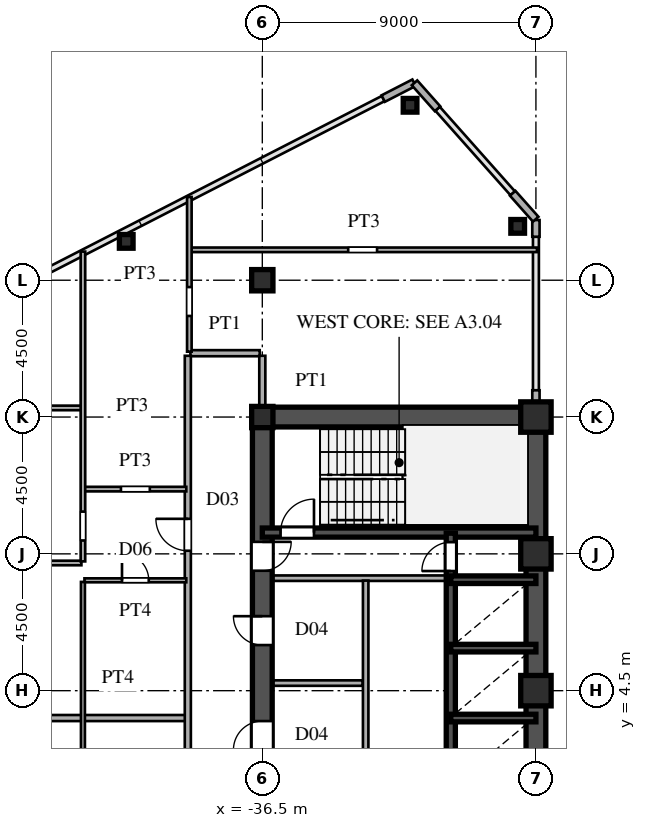
"""IFC4 building model, lengths in metres.
Left out: names, types, materials, properties, quantities, classifications, styles, units other than length and angle.
Written with IfcOpenShell. Run it as: python <this file> out.ifc"""

import sys

from ifc_helpers import new_model, si_unit, direction, frame, frame_2d, origin, origin_2d, place, context, subcontext, project, spatial, rectangle, hollow_rectangle, i_section, extrude, source, transform, mapped, element, fill, save


model = new_model("IFC4")
c1 = context("Model", 3, precision=1e-05, world=origin(), true_north=direction((0.0, 1.0)))
c2 = subcontext(c1, "Body", "Model", "MODEL_VIEW")
j1 = project(units=[si_unit("LENGTHUNIT", "METRE"), si_unit("PLANEANGLEUNIT", "RADIAN")], contexts=[c1])
p1 = place(None, origin())
s1 = spatial("IfcSite", under=j1, at=p1, CompositionType="ELEMENT")
p2 = place(p1, origin())
s2 = spatial("IfcBuilding", under=s1, at=p2, CompositionType="ELEMENT")
p3 = place(p2, frame((0.0, 0.0, 117.6)))
s3 = spatial("IfcBuildingStorey", under=s2, at=p3, CompositionType="ELEMENT", Elevation=117.6)
m1 = source(origin(), c2, "Body", "SweptSolid", [
    extrude(hollow_rectangle(XDim=1.0, YDim=1.0, WallThickness=0.042, at=origin_2d()), origin(), (0.0, 0.0, 1.0), 3.6),
])
for number, where, z_axis, x_axis in (
    (1, (-27.5, 4.5, 0.0), (0.0, 0.0, 1.0), (1.0, 0.0, 0.0)),
    (2, (-27.5, 9.0, 0.0), (0.0, 0.0, 1.0), (1.0, 0.0, 0.0)),
    (3, (-27.5, 13.5, 0.0), (0.0, 0.0, 1.0), (1.0, 0.0, 0.0)),
):
    element("IfcColumn", number, at=place(p3, frame(where, z_axis=z_axis, x_axis=x_axis)), inside=s3, PredefinedType="COLUMN", context=c2, shape_type="MappedRepresentation", body=[
        mapped(m1, transform((0.0, 0.0, 0.0), scale=1.0)),
    ])
m2 = source(origin(), c2, "Body", "SweptSolid", [
    extrude(i_section(OverallWidth=0.7, OverallDepth=0.7, WebThickness=0.028, FlangeThickness=0.045, at=origin_2d()), origin(), (0.0, 0.0, 1.0), 3.6),
])
for number, where, z_axis, x_axis in (
    (4, (-36.5, 13.5, 0.0), (0.0, 0.0, 1.0), (1.0, 0.0, 0.0)),
    (5, (-36.5, 18.0, 0.0), (0.0, 0.0, 1.0), (1.0, 0.0, 0.0)),
):
    element("IfcColumn", number, at=place(p3, frame(where, z_axis=z_axis, x_axis=x_axis)), inside=s3, PredefinedType="COLUMN", context=c2, shape_type="MappedRepresentation", body=[
        mapped(m2, transform((0.0, 0.0, 0.0), scale=1.0)),
    ])
m3 = source(origin(), c2, "Body", "SweptSolid", [
    extrude(hollow_rectangle(XDim=0.45, YDim=0.45, WallThickness=0.018, at=origin_2d()), origin(), (0.0, 0.0, 1.0), 3.6),
])
for number, where, z_axis, x_axis in (
    (6, (-28.1, 19.772, 0.0), (0.0, 0.0, 1.0), (1.0, 0.0, 0.0)),
    (7, (-31.64, 23.754, 0.0), (0.0, 0.0, 1.0), (1.0, 0.0, 0.0)),
    (8, (-40.976, 19.278, 0.0), (0.0, 0.0, 1.0), (1.0, 0.0, 0.0)),
):
    element("IfcColumn", number, at=place(p3, frame(where, z_axis=z_axis, x_axis=x_axis)), inside=s3, PredefinedType="COLUMN", context=c2, shape_type="MappedRepresentation", body=[
        mapped(m3, transform((0.0, 0.0, 0.0), scale=1.0)),
    ])
p4 = place(p3, frame((-27.5, 13.83, 0.0), z_axis=(0.0, 0.0, 1.0), x_axis=(0.0, 1.0, 0.0)))
e9 = element("IfcWall", 9, at=p4, inside=s3, PredefinedType="SOLIDWALL", context=c2, shape_type="SweptSolid", body=[
    extrude(rectangle(XDim=0.55, YDim=0.24, at=frame_2d((0.275, 0.0))), origin(), (0.0, 0.0, 1.0), 2.88),
])
p5 = place(p3, frame((-27.5, 19.43, 0.0), z_axis=(0.0, 0.0, 1.0), x_axis=(0.0, 1.0, 0.0)))
e10 = element("IfcWall", 10, at=p5, inside=s3, PredefinedType="SOLIDWALL", context=c2, shape_type="SweptSolid", body=[
    extrude(rectangle(XDim=0.55, YDim=0.24, at=frame_2d((0.275, 0.0))), origin(), (0.0, 0.0, 1.0), 3.38),
])
for number, where, z_axis, x_axis in (
    (11, (-27.507, 20.008, 0.0), (0.0, 0.0, 1.0), (-0.664, 0.747, 0.0)),
    (12, (-30.736, 23.64, 0.0), (0.0, 0.0, 1.0), (-0.664, 0.747, 0.0)),
):
    element("IfcWall", number, at=place(p3, frame(where, z_axis=z_axis, x_axis=x_axis)), inside=s3, PredefinedType="SOLIDWALL", context=c2, shape_type="SweptSolid", body=[
        extrude(rectangle(XDim=1.14, YDim=0.24, at=frame_2d((0.57, 0.0))), origin(), (0.0, 0.0, 1.0), 3.38),
    ])
p6 = place(p3, frame((-31.509, 24.495, 0.0), z_axis=(0.0, 0.0, 1.0), x_axis=(-0.889797395748, -0.456355776255, 0.0)))
e13 = element("IfcWall", 13, at=p6, inside=s3, PredefinedType="SOLIDWALL", context=c2, shape_type="SweptSolid", body=[
    extrude(rectangle(XDim=1.14, YDim=0.24, at=frame_2d((0.57, 0.0))), origin(), (0.0, 0.0, 1.0), 3.38),
])
p7 = place(p3, frame((-27.5, 1.3, 0.0), z_axis=(0.0, 0.0, 1.0), x_axis=(0.0, 1.0, 0.0)))
e14 = element("IfcWall", 14, at=p7, inside=s3, PredefinedType="SHEAR", context=c2, shape_type="SweptSolid", body=[
    extrude(rectangle(XDim=12.2, YDim=0.65, at=frame_2d((6.1, 0.0))), origin(), (0.0, 0.0, 1.0), 3.38),
])
p8 = place(p3, frame((-36.5, 13.5, 0.0), z_axis=(0.0, 0.0, 1.0), x_axis=(1.0, 0.0, 0.0)))
e15 = element("IfcWall", 15, at=p8, inside=s3, PredefinedType="SHEAR", context=c2, shape_type="SweptSolid", body=[
    extrude(rectangle(XDim=9.0, YDim=0.65, at=frame_2d((4.5, 0.0))), origin(), (0.0, 0.0, 1.0), 3.38),
])
p9 = place(p3, frame((-36.5, 8.2, 0.0), z_axis=(0.0, 0.0, 1.0), x_axis=(0.0, 1.0, 0.0)))
e16 = element("IfcWall", 16, at=p9, inside=s3, PredefinedType="SHEAR", context=c2, shape_type="SweptSolid", body=[
    extrude(rectangle(XDim=5.45, YDim=0.65, at=frame_2d((2.725, 0.0))), origin(), (0.0, 0.0, 1.0), 3.38),
])
p10 = place(p9, frame((0.245, 0.0, 0.0)))
e17 = element("IfcOpeningElement", 17, at=p10, cuts=e16, PredefinedType="OPENING", context=c2, shape_type="SweptSolid", body=[
    extrude(rectangle(XDim=0.95, YDim=2.15, at=frame_2d((0.475, 1.075))), frame((0.0, 0.335, 0.0), z_axis=(0.0, -1.0, 0.0), x_axis=(1.0, 0.0, 0.0)), (0.0, 0.0, 1.0), 0.67),
])
p11 = place(p3, frame((-36.5, 1.3, 0.0), z_axis=(0.0, 0.0, 1.0), x_axis=(0.0, 1.0, 0.0)))
e18 = element("IfcWall", 18, at=p11, inside=s3, PredefinedType="SHEAR", context=c2, shape_type="SweptSolid", body=[
    extrude(rectangle(XDim=3.45, YDim=0.65, at=frame_2d((1.725, 0.0))), origin(), (0.0, 0.0, 1.0), 3.38),
])
p12 = place(p11, frame((1.25, 0.0, 0.0)))
e19 = element("IfcOpeningElement", 19, at=p12, cuts=e18, PredefinedType="OPENING", context=c2, shape_type="SweptSolid", body=[
    extrude(rectangle(XDim=0.95, YDim=2.15, at=frame_2d((0.475, 1.075))), frame((0.0, 0.335, 0.0), z_axis=(0.0, -1.0, 0.0), x_axis=(1.0, 0.0, 0.0)), (0.0, 0.0, 1.0), 0.67),
])
p13 = place(p3, frame((-36.5, 4.75, 0.0), z_axis=(0.0, 0.0, 1.0), x_axis=(0.0, 1.0, 0.0)))
e20 = element("IfcWall", 20, at=p13, inside=s3, PredefinedType="SHEAR", context=c2, shape_type="SweptSolid", body=[
    extrude(rectangle(XDim=3.45, YDim=0.65, at=frame_2d((1.725, 0.0))), origin(), (0.0, 0.0, 1.0), 3.38),
])
p14 = place(p13, frame((1.25, 0.0, 0.0)))
e21 = element("IfcOpeningElement", 21, at=p14, cuts=e20, PredefinedType="OPENING", context=c2, shape_type="SweptSolid", body=[
    extrude(rectangle(XDim=0.95, YDim=2.15, at=frame_2d((0.475, 1.075))), frame((0.0, 0.335, 0.0), z_axis=(0.0, -1.0, 0.0), x_axis=(1.0, 0.0, 0.0)), (0.0, 0.0, 1.0), 0.67),
])
p15 = place(p3, frame((-36.5, 9.7, 0.0), z_axis=(0.0, 0.0, 1.0), x_axis=(1.0, 0.0, 0.0)))
e22 = element("IfcWall", 22, at=p15, inside=s3, PredefinedType="SHEAR", context=c2, shape_type="SweptSolid", body=[
    extrude(rectangle(XDim=9.0, YDim=0.3, at=frame_2d((4.5, 0.0))), origin(), (0.0, 0.0, 1.0), 3.38),
])
p16 = place(p15, frame((0.6, 0.0, 0.0)))
e23 = element("IfcOpeningElement", 23, at=p16, cuts=e22, PredefinedType="OPENING", context=c2, shape_type="SweptSolid", body=[
    extrude(rectangle(XDim=1.1, YDim=2.2, at=frame_2d((0.55, 1.1))), frame((0.0, 0.16, 0.0), z_axis=(0.0, -1.0, 0.0), x_axis=(1.0, 0.0, 0.0)), (0.0, 0.0, 1.0), 0.32),
])
for number, where, z_axis, x_axis in (
    (24, (-30.3, 3.6, 0.0), (0.0, 0.0, 1.0), (1.0, 0.0, 0.0)),
    (25, (-30.3, 5.9, 0.0), (0.0, 0.0, 1.0), (1.0, 0.0, 0.0)),
    (26, (-30.3, 8.15, 0.0), (0.0, 0.0, 1.0), (1.0, 0.0, 0.0)),
):
    element("IfcWall", number, at=place(p3, frame(where, z_axis=z_axis, x_axis=x_axis)), inside=s3, PredefinedType="SHEAR", context=c2, shape_type="SweptSolid", body=[
        extrude(rectangle(XDim=2.8, YDim=0.25, at=frame_2d((1.4, 0.0))), origin(), (0.0, 0.0, 1.0), 3.38),
    ])
p17 = place(p3, frame((-30.3, 1.32, 0.0), z_axis=(0.0, 0.0, 1.0), x_axis=(0.0, 1.0, 0.0)))
e27 = element("IfcWall", 27, at=p17, inside=s3, PredefinedType="SHEAR", context=c2, shape_type="SweptSolid", body=[
    extrude(rectangle(XDim=2.28, YDim=0.3, at=frame_2d((1.14, 0.0))), origin(), (0.0, 0.0, 1.0), 3.38),
])
p18 = place(p3, frame((-30.3, 3.6, 0.0), z_axis=(0.0, 0.0, 1.0), x_axis=(0.0, 1.0, 0.0)))
e28 = element("IfcWall", 28, at=p18, inside=s3, PredefinedType="SHEAR", context=c2, shape_type="SweptSolid", body=[
    extrude(rectangle(XDim=2.3, YDim=0.3, at=frame_2d((1.15, 0.0))), origin(), (0.0, 0.0, 1.0), 3.38),
])
p19 = place(p3, frame((-30.3, 5.9, 0.0), z_axis=(0.0, 0.0, 1.0), x_axis=(0.0, 1.0, 0.0)))
e29 = element("IfcWall", 29, at=p19, inside=s3, PredefinedType="SHEAR", context=c2, shape_type="SweptSolid", body=[
    extrude(rectangle(XDim=2.25, YDim=0.3, at=frame_2d((1.125, 0.0))), origin(), (0.0, 0.0, 1.0), 3.38),
])
p20 = place(p3, frame((-30.3, 8.15, 0.0), z_axis=(0.0, 0.0, 1.0), x_axis=(0.0, 1.0, 0.0)))
e30 = element("IfcWall", 30, at=p20, inside=s3, PredefinedType="SHEAR", context=c2, shape_type="SweptSolid", body=[
    extrude(rectangle(XDim=1.53, YDim=0.3, at=frame_2d((0.765, 0.0))), origin(), (0.0, 0.0, 1.0), 3.38),
])
p21 = place(p20, frame((0.285, 0.0, 0.0)))
e31 = element("IfcOpeningElement", 31, at=p21, cuts=e30, PredefinedType="OPENING", context=c2, shape_type="SweptSolid", body=[
    extrude(rectangle(XDim=0.95, YDim=2.15, at=frame_2d((0.475, 1.075))), frame((0.0, 0.16, 0.0), z_axis=(0.0, -1.0, 0.0), x_axis=(1.0, 0.0, 0.0)), (0.0, 0.0, 1.0), 0.32),
])
p22 = place(p3, frame((-36.15, 8.2, 0.0), z_axis=(0.0, 0.0, 1.0), x_axis=(1.0, 0.0, 0.0)))
e32 = element("IfcWall", 32, at=p22, inside=s3, PredefinedType="PARTITIONING", context=c2, shape_type="SweptSolid", body=[
    extrude(rectangle(XDim=5.7, YDim=0.18, at=frame_2d((2.85, 0.0))), origin(), (0.0, 0.0, 1.0), 3.38),
])
p23 = place(p3, frame((-33.1, 1.38, 0.0), z_axis=(0.0, 0.0, 1.0), x_axis=(0.0, 1.0, 0.0)))
e33 = element("IfcWall", 33, at=p23, inside=s3, PredefinedType="PARTITIONING", context=c2, shape_type="SweptSolid", body=[
    extrude(rectangle(XDim=6.74, YDim=0.18, at=frame_2d((3.37, 0.0))), origin(), (0.0, 0.0, 1.0), 3.38),
])
p24 = place(p3, frame((-36.15, 4.75, 0.0), z_axis=(0.0, 0.0, 1.0), x_axis=(1.0, 0.0, 0.0)))
e34 = element("IfcWall", 34, at=p24, inside=s3, PredefinedType="PARTITIONING", context=c2, shape_type="SweptSolid", body=[
    extrude(rectangle(XDim=2.95, YDim=0.18, at=frame_2d((1.475, 0.0))), origin(), (0.0, 0.0, 1.0), 3.38),
])
p25 = place(p3, frame((-69.505, 3.6, 0.0), z_axis=(0.0, 0.0, 1.0), x_axis=(1.0, 0.0, 0.0)))
e35 = element("IfcWall", 35, at=p25, inside=s3, PredefinedType="PARTITIONING", context=c2, shape_type="SweptSolid", body=[
    extrude(rectangle(XDim=30.475, YDim=0.2, at=frame_2d((15.237, 0.0))), origin(), (0.0, 0.0, 1.0), 3.38),
])
p26 = place(p3, frame((-42.35, 8.13, 0.0), z_axis=(0.0, 0.0, 1.0), x_axis=(1.0, 0.0, 0.0)))
e36 = element("IfcWall", 36, at=p26, inside=s3, PredefinedType="PARTITIONING", context=c2, shape_type="SweptSolid", body=[
    extrude(rectangle(XDim=3.35, YDim=0.13, at=frame_2d((1.675, 0.0))), origin(), (0.0, 0.0, 1.0), 3.38),
])
p27 = place(p26, frame((1.235, 0.0, 0.0)))
e37 = element("IfcOpeningElement", 37, at=p27, cuts=e36, PredefinedType="OPENING", context=c2, shape_type="SweptSolid", body=[
    extrude(rectangle(XDim=0.88, YDim=2.1, at=frame_2d((0.44, 1.05))), frame((0.0, 0.075, 0.0), z_axis=(0.0, -1.0, 0.0), x_axis=(1.0, 0.0, 0.0)), (0.0, 0.0, 1.0), 0.15),
])
p28 = place(p3, frame((-62.321, 8.7, 0.0), z_axis=(0.0, 0.0, 1.0), x_axis=(1.0, 0.0, 0.0)))
e38 = element("IfcWall", 38, at=p28, inside=s3, PredefinedType="PARTITIONING", context=c2, shape_type="SweptSolid", body=[
    extrude(rectangle(XDim=19.871, YDim=0.15, at=frame_2d((9.936, 0.0))), origin(), (0.0, 0.0, 1.0), 3.38),
])
p29 = place(p28, frame((16.421, 0.0, 0.0)))
e39 = element("IfcOpeningElement", 39, at=p29, cuts=e38, PredefinedType="OPENING", context=c2, shape_type="SweptSolid", body=[
    extrude(rectangle(XDim=0.95, YDim=2.15, at=frame_2d((0.475, 1.075))), frame((0.0, 0.085, 0.0), z_axis=(0.0, -1.0, 0.0), x_axis=(1.0, 0.0, 0.0)), (0.0, 0.0, 1.0), 0.17),
])
p30 = place(p3, frame((-42.35, 11.13, 0.0), z_axis=(0.0, 0.0, 1.0), x_axis=(1.0, 0.0, 0.0)))
e40 = element("IfcWall", 40, at=p30, inside=s3, PredefinedType="PARTITIONING", context=c2, shape_type="SweptSolid", body=[
    extrude(rectangle(XDim=3.35, YDim=0.15, at=frame_2d((1.675, 0.0))), origin(), (0.0, 0.0, 1.0), 3.38),
])
p31 = place(p30, frame((1.2, 0.0, 0.0)))
e41 = element("IfcOpeningElement", 41, at=p31, cuts=e40, PredefinedType="OPENING", context=c2, shape_type="SweptSolid", body=[
    extrude(rectangle(XDim=0.95, YDim=2.15, at=frame_2d((0.475, 1.075))), frame((0.0, 0.085, 0.0), z_axis=(0.0, -1.0, 0.0), x_axis=(1.0, 0.0, 0.0)), (0.0, 0.0, 1.0), 0.17),
])
p32 = place(p3, frame((-52.378, 13.8, 0.0), z_axis=(0.0, 0.0, 1.0), x_axis=(1.0, 0.0, 0.0)))
e42 = element("IfcWall", 42, at=p32, inside=s3, PredefinedType="PARTITIONING", context=c2, shape_type="SweptSolid", body=[
    extrude(rectangle(XDim=9.928, YDim=0.15, at=frame_2d((4.964, 0.0))), origin(), (0.0, 0.0, 1.0), 2.78),
])
p33 = place(p32, frame((7.351, 0.0, 0.0)))
e43 = element("IfcOpeningElement", 43, at=p33, cuts=e42, PredefinedType="OPENING", context=c2, shape_type="SweptSolid", body=[
    extrude(rectangle(XDim=0.95, YDim=2.15, at=frame_2d((0.475, 1.075))), frame((0.0, 0.085, 0.0), z_axis=(0.0, -1.0, 0.0), x_axis=(1.0, 0.0, 0.0)), (0.0, 0.0, 1.0), 0.17),
])
p34 = place(p3, frame((-38.865, 15.6, 0.0), z_axis=(0.0, 0.0, 1.0), x_axis=(1.0, 0.0, 0.0)))
e44 = element("IfcWall", 44, at=p34, inside=s3, PredefinedType="PARTITIONING", context=c2, shape_type="SweptSolid", body=[
    extrude(rectangle(XDim=2.28, YDim=0.2, at=frame_2d((1.14, 0.0))), origin(), (0.0, 0.0, 1.0), 3.38),
])
p35 = place(p3, frame((-38.85, 19.0, 0.0), z_axis=(0.0, 0.0, 1.0), x_axis=(1.0, 0.0, 0.0)))
e45 = element("IfcWall", 45, at=p35, inside=s3, PredefinedType="PARTITIONING", context=c2, shape_type="SweptSolid", body=[
    extrude(rectangle(XDim=11.385, YDim=0.15, at=frame_2d((5.692, 0.0))), origin(), (0.0, 0.0, 1.0), 3.38),
])
p36 = place(p35, frame((5.175, 0.0, 0.0)))
e46 = element("IfcOpeningElement", 46, at=p36, cuts=e45, PredefinedType="OPENING", context=c2, shape_type="SweptSolid", body=[
    extrude(rectangle(XDim=0.95, YDim=2.15, at=frame_2d((0.475, 1.075))), frame((0.0, 0.085, 0.0), z_axis=(0.0, -1.0, 0.0), x_axis=(1.0, 0.0, 0.0)), (0.0, 0.0, 1.0), 0.17),
])
p37 = place(p3, frame((-42.4, -0.548, 0.0), z_axis=(0.0, 0.0, 1.0), x_axis=(0.0, 1.0, 0.0)))
e47 = element("IfcWall", 47, at=p37, inside=s3, PredefinedType="PARTITIONING", context=c2, shape_type="SweptSolid", body=[
    extrude(rectangle(XDim=8.625, YDim=0.13, at=frame_2d((4.312, 0.0))), origin(), (0.0, 0.0, 1.0), 3.38),
])
p38 = place(p3, frame((-42.4, 8.752, 0.0), z_axis=(0.0, 0.0, 1.0), x_axis=(0.0, 1.0, 0.0)))
e48 = element("IfcWall", 48, at=p38, inside=s3, PredefinedType="PARTITIONING", context=c2, shape_type="SweptSolid", body=[
    extrude(rectangle(XDim=10.19, YDim=0.15, at=frame_2d((5.095, 0.0))), origin(), (0.0, 0.0, 1.0), 3.38),
])
p39 = place(p38, frame((0.688, 0.0, 0.0)))
e49 = element("IfcOpeningElement", 49, at=p39, cuts=e48, PredefinedType="OPENING", context=c2, shape_type="SweptSolid", body=[
    extrude(rectangle(XDim=0.95, YDim=2.15, at=frame_2d((0.475, 1.075))), frame((0.0, 0.085, 0.0), z_axis=(0.0, -1.0, 0.0), x_axis=(1.0, 0.0, 0.0)), (0.0, 0.0, 1.0), 0.17),
])
p40 = place(p3, frame((-38.95, -15.515, 0.0), z_axis=(0.0, 0.0, 1.0), x_axis=(0.0, 1.0, 0.0)))
e50 = element("IfcWall", 50, at=p40, inside=s3, PredefinedType="PARTITIONING", context=c2, shape_type="SweptSolid", body=[
    extrude(rectangle(XDim=31.03, YDim=0.2, at=frame_2d((15.515, 0.0))), origin(), (0.0, 0.0, 1.0), 3.38),
])
p41 = place(p40, frame((1.99, 0.0, 0.0)))
e51 = element("IfcOpeningElement", 51, at=p41, cuts=e50, PredefinedType="OPENING", context=c2, shape_type="SweptSolid", body=[
    extrude(rectangle(XDim=1.05, YDim=2.25, at=frame_2d((0.525, 1.125))), frame((0.0, 0.11, 0.0), z_axis=(0.0, -1.0, 0.0), x_axis=(1.0, 0.0, 0.0)), (0.0, 0.0, 1.0), 0.22),
])
p42 = place(p40, frame((11.38, 0.0, 0.0)))
e52 = element("IfcOpeningElement", 52, at=p42, cuts=e50, PredefinedType="OPENING", context=c2, shape_type="SweptSolid", body=[
    extrude(rectangle(XDim=1.05, YDim=2.25, at=frame_2d((0.525, 1.125))), frame((0.0, 0.11, 0.0), z_axis=(0.0, -1.0, 0.0), x_axis=(1.0, 0.0, 0.0)), (0.0, 0.0, 1.0), 0.22),
])
p43 = place(p40, frame((24.617, 0.0, 0.0)))
e53 = element("IfcOpeningElement", 53, at=p43, cuts=e50, PredefinedType="OPENING", context=c2, shape_type="SweptSolid", body=[
    extrude(rectangle(XDim=1.05, YDim=2.25, at=frame_2d((0.525, 1.125))), frame((0.0, 0.11, 0.0), z_axis=(0.0, -1.0, 0.0), x_axis=(1.0, 0.0, 0.0)), (0.0, 0.0, 1.0), 0.22),
])
p44 = place(p3, frame((-38.9, 15.65, 0.0), z_axis=(0.0, 0.0, 1.0), x_axis=(0.0, 1.0, 0.0)))
e54 = element("IfcWall", 54, at=p44, inside=s3, PredefinedType="PARTITIONING", context=c2, shape_type="SweptSolid", body=[
    extrude(rectangle(XDim=5.088, YDim=0.15, at=frame_2d((2.544, 0.0))), origin(), (0.0, 0.0, 1.0), 3.38),
])
p45 = place(p44, frame((1.175, 0.0, 0.0)))
e55 = element("IfcOpeningElement", 55, at=p45, cuts=e54, PredefinedType="OPENING", context=c2, shape_type="SweptSolid", body=[
    extrude(rectangle(XDim=0.95, YDim=2.15, at=frame_2d((0.475, 1.075))), frame((0.0, 0.085, 0.0), z_axis=(0.0, -1.0, 0.0), x_axis=(1.0, 0.0, 0.0)), (0.0, 0.0, 1.0), 0.17),
])
p46 = place(p3, frame((-36.5, 13.83, 0.0), z_axis=(0.0, 0.0, 1.0), x_axis=(0.0, 1.0, 0.0)))
e56 = element("IfcWall", 56, at=p46, inside=s3, PredefinedType="PARTITIONING", context=c2, shape_type="SweptSolid", body=[
    extrude(rectangle(XDim=1.685, YDim=0.2, at=frame_2d((0.842, 0.0))), origin(), (0.0, 0.0, 1.0), 2.78),
])
m4 = source(origin(), c2, "Body", "SweptSolid", [
    extrude(rectangle(XDim=0.95, YDim=2.15, at=frame_2d((0.475, 1.075))), frame((0.0, 0.025, 0.0), z_axis=(0.0, -1.0, 0.0), x_axis=(1.0, 0.0, 0.0)), (0.0, 0.0, 1.0), 0.05),
])
p47 = place(p10, frame((0.95, 0.0, 0.0), z_axis=(0.0, 0.0, 1.0), x_axis=(-1.0, 0.0, 0.0)))
e57 = element("IfcDoor", 57, at=p47, inside=s3, OperationType="SINGLE_SWING_RIGHT", PredefinedType="DOOR", context=c2, shape_type="MappedRepresentation", body=[
    mapped(m4, transform((0.0, 0.0, 0.0), scale=1.0)),
])
fill(e17, e57)
p48 = place(p12, origin())
e58 = element("IfcDoor", 58, at=p48, inside=s3, OperationType="SINGLE_SWING_LEFT", PredefinedType="DOOR", context=c2, shape_type="MappedRepresentation", body=[
    mapped(m4, transform((0.0, 0.0, 0.0), scale=1.0)),
])
fill(e19, e58)
p49 = place(p14, origin())
e59 = element("IfcDoor", 59, at=p49, inside=s3, OperationType="SINGLE_SWING_RIGHT", PredefinedType="DOOR", context=c2, shape_type="MappedRepresentation", body=[
    mapped(m4, transform((0.0, 0.0, 0.0), scale=1.0)),
])
fill(e21, e59)
m5 = source(origin(), c2, "Body", "SweptSolid", [
    extrude(rectangle(XDim=1.1, YDim=2.2, at=frame_2d((0.55, 1.1))), frame((0.0, 0.025, 0.0), z_axis=(0.0, -1.0, 0.0), x_axis=(1.0, 0.0, 0.0)), (0.0, 0.0, 1.0), 0.05),
])
p50 = place(p16, origin())
e60 = element("IfcDoor", 60, at=p50, inside=s3, OperationType="SINGLE_SWING_RIGHT", PredefinedType="DOOR", context=c2, shape_type="MappedRepresentation", body=[
    mapped(m5, transform((0.0, 0.0, 0.0), scale=1.0)),
])
fill(e23, e60)
p51 = place(p21, origin())
e61 = element("IfcDoor", 61, at=p51, inside=s3, OperationType="SINGLE_SWING_LEFT", PredefinedType="DOOR", context=c2, shape_type="MappedRepresentation", body=[
    mapped(m4, transform((0.0, 0.0, 0.0), scale=1.0)),
])
fill(e31, e61)
m6 = source(origin(), c2, "Body", "SweptSolid", [
    extrude(rectangle(XDim=0.88, YDim=2.1, at=frame_2d((0.44, 1.05))), frame((0.0, 0.025, 0.0), z_axis=(0.0, -1.0, 0.0), x_axis=(1.0, 0.0, 0.0)), (0.0, 0.0, 1.0), 0.05),
])
p52 = place(p27, origin())
e62 = element("IfcDoor", 62, at=p52, inside=s3, OperationType="SINGLE_SWING_LEFT", PredefinedType="DOOR", context=c2, shape_type="MappedRepresentation", body=[
    mapped(m6, transform((0.0, 0.0, 0.0), scale=1.0)),
])
fill(e37, e62)
m7 = source(origin(), c2, "Body", "SweptSolid", [
    extrude(rectangle(XDim=1.05, YDim=2.25, at=frame_2d((0.525, 1.125))), frame((0.0, 0.025, 0.0), z_axis=(0.0, -1.0, 0.0), x_axis=(1.0, 0.0, 0.0)), (0.0, 0.0, 1.0), 0.05),
])
p53 = place(p43, origin())
e63 = element("IfcDoor", 63, at=p53, inside=s3, OperationType="SINGLE_SWING_RIGHT", PredefinedType="DOOR", context=c2, shape_type="MappedRepresentation", body=[
    mapped(m7, transform((0.0, 0.0, 0.0), scale=1.0)),
])
fill(e53, e63)
save(model, sys.argv[1])
